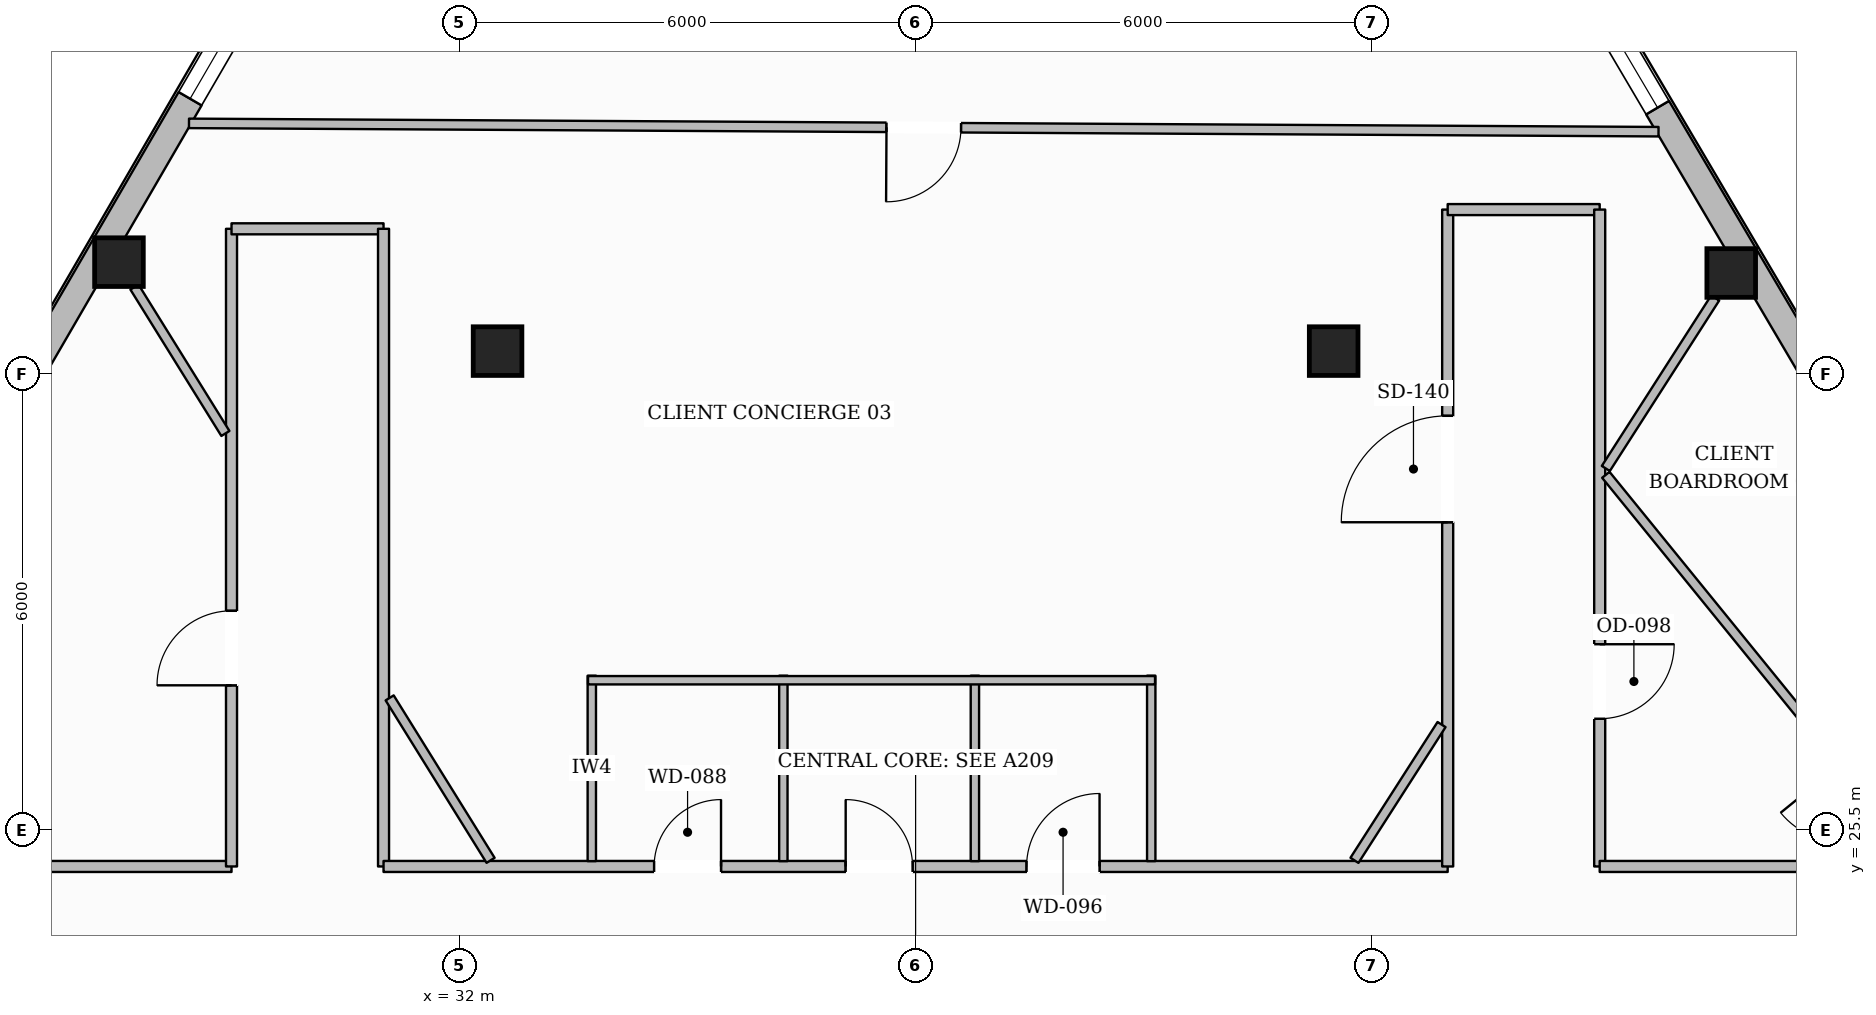
"""IFC4 building model, lengths in metres.
Left out: names, types, materials, properties, quantities, classifications, styles, units other than length and angle.
Written with IfcOpenShell. Run it as: python <this file> out.ifc"""

import sys

from ifc_helpers import new_model, si_unit, direction, frame, frame_2d, origin, origin_2d, place, context, subcontext, project, spatial, rectangle, hollow_rectangle, extrude, element, fill, save


model = new_model("IFC4")
c1 = context("Model", 3, precision=1e-05, world=origin(), true_north=direction((0.0, 1.0)))
c2 = subcontext(c1, "Body", "Model", "MODEL_VIEW")
j1 = project(units=[si_unit("LENGTHUNIT", "METRE"), si_unit("PLANEANGLEUNIT", "RADIAN")], contexts=[c1])
p1 = place(None, origin())
s1 = spatial("IfcSite", under=j1, at=p1, CompositionType="ELEMENT")
p2 = place(p1, origin())
s2 = spatial("IfcBuilding", under=s1, at=p2, CompositionType="ELEMENT")
p3 = place(p2, frame((0.0, 0.0, 195.8)))
s3 = spatial("IfcBuildingStorey", under=s2, at=p3, CompositionType="ELEMENT", Elevation=195.8)
for number, where, z_axis, x_axis in (
    (1, (27.519, 32.97, 0.0), (0.0, 0.0, 1.0), (1.0, 0.0, 0.0)),
    (2, (48.73, 32.828, 0.0), (0.0, 0.0, 1.0), (1.0, 0.0, 0.0)),
    (3, (32.5, 31.8, 0.0), (0.0, 0.0, 1.0), (1.0, 0.0, 0.0)),
    (4, (43.5, 31.8, 0.0), (0.0, 0.0, 1.0), (1.0, 0.0, 0.0)),
):
    element("IfcColumn", number, at=place(p3, frame(where, z_axis=z_axis, x_axis=x_axis)), inside=s3, PredefinedType="COLUMN", context=c2, shape_type="SweptSolid", body=[
        extrude(hollow_rectangle(XDim=0.64, YDim=0.64, WallThickness=0.028, at=origin_2d()), origin(), (0.0, 0.0, 1.0), 3.6),
    ])
p4 = place(p3, frame((14.773, 11.555, 0.0), z_axis=(0.0, 0.0, 1.0), x_axis=(0.502113441051, 0.864801764751, 0.0)))
e5 = element("IfcWall", 5, at=p4, inside=s3, PredefinedType="STANDARD", context=c2, shape_type="SweptSolid", body=[
    extrude(rectangle(XDim=37.618, YDim=0.35, at=frame_2d((18.809, 0.0))), origin(), (0.0, 0.0, 1.0), 3.132),
])
p5 = place(p4, frame((33.36, 0.0, 0.65)))
e6 = element("IfcOpeningElement", 6, at=p5, cuts=e5, PredefinedType="OPENING", context=c2, shape_type="SweptSolid", body=[
    extrude(rectangle(XDim=1.45, YDim=1.75, at=frame_2d((0.725, 0.875))), frame((0.0, 0.185, 0.0), z_axis=(0.0, -1.0, 0.0), x_axis=(1.0, 0.0, 0.0)), (0.0, 0.0, 1.0), 0.37),
])
p6 = place(p4, frame((27.25, 0.0, 0.65)))
e7 = element("IfcOpeningElement", 7, at=p6, cuts=e5, PredefinedType="OPENING", context=c2, shape_type="SweptSolid", body=[
    extrude(rectangle(XDim=1.45, YDim=1.75, at=frame_2d((0.725, 0.875))), frame((0.0, 0.185, 0.0), z_axis=(0.0, -1.0, 0.0), x_axis=(1.0, 0.0, 0.0)), (0.0, 0.0, 1.0), 0.37),
])
p7 = place(p4, frame((15.03, 0.0, 0.65)))
e8 = element("IfcOpeningElement", 8, at=p7, cuts=e5, PredefinedType="OPENING", context=c2, shape_type="SweptSolid", body=[
    extrude(rectangle(XDim=1.45, YDim=1.75, at=frame_2d((0.725, 0.875))), frame((0.0, 0.185, 0.0), z_axis=(0.0, -1.0, 0.0), x_axis=(1.0, 0.0, 0.0)), (0.0, 0.0, 1.0), 0.37),
])
p8 = place(p4, frame((8.92, 0.0, 0.65)))
e9 = element("IfcOpeningElement", 9, at=p8, cuts=e5, PredefinedType="OPENING", context=c2, shape_type="SweptSolid", body=[
    extrude(rectangle(XDim=1.45, YDim=1.75, at=frame_2d((0.725, 0.875))), frame((0.0, 0.185, 0.0), z_axis=(0.0, -1.0, 0.0), x_axis=(1.0, 0.0, 0.0)), (0.0, 0.0, 1.0), 0.37),
])
p9 = place(p4, frame((2.811, 0.0, 0.65)))
e10 = element("IfcOpeningElement", 10, at=p9, cuts=e5, PredefinedType="OPENING", context=c2, shape_type="SweptSolid", body=[
    extrude(rectangle(XDim=1.45, YDim=1.75, at=frame_2d((0.725, 0.875))), frame((0.0, 0.185, 0.0), z_axis=(0.0, -1.0, 0.0), x_axis=(1.0, 0.0, 0.0)), (0.0, 0.0, 1.0), 0.37),
])
p10 = place(p3, frame((42.444, 44.024, 0.0), z_axis=(0.0, 0.0, 1.0), x_axis=(0.507770038723, -0.861492651028, 0.0)))
e11 = element("IfcWall", 11, at=p10, inside=s3, PredefinedType="STANDARD", context=c2, shape_type="SweptSolid", body=[
    extrude(rectangle(XDim=38.049, YDim=0.35, at=frame_2d((19.024, 0.0))), origin(), (0.0, 0.0, 1.0), 3.132),
])
p11 = place(p10, frame((33.752, 0.0, 0.65)))
e12 = element("IfcOpeningElement", 12, at=p11, cuts=e11, PredefinedType="OPENING", context=c2, shape_type="SweptSolid", body=[
    extrude(rectangle(XDim=1.45, YDim=1.75, at=frame_2d((0.725, 0.875))), frame((0.0, 0.185, 0.0), z_axis=(0.0, -1.0, 0.0), x_axis=(1.0, 0.0, 0.0)), (0.0, 0.0, 1.0), 0.37),
])
p12 = place(p10, frame((27.569, 0.0, 0.65)))
e13 = element("IfcOpeningElement", 13, at=p12, cuts=e11, PredefinedType="OPENING", context=c2, shape_type="SweptSolid", body=[
    extrude(rectangle(XDim=1.45, YDim=1.75, at=frame_2d((0.725, 0.875))), frame((0.0, 0.185, 0.0), z_axis=(0.0, -1.0, 0.0), x_axis=(1.0, 0.0, 0.0)), (0.0, 0.0, 1.0), 0.37),
])
p13 = place(p10, frame((15.204, 0.0, 0.65)))
e14 = element("IfcOpeningElement", 14, at=p13, cuts=e11, PredefinedType="OPENING", context=c2, shape_type="SweptSolid", body=[
    extrude(rectangle(XDim=1.45, YDim=1.75, at=frame_2d((0.725, 0.875))), frame((0.0, 0.185, 0.0), z_axis=(0.0, -1.0, 0.0), x_axis=(1.0, 0.0, 0.0)), (0.0, 0.0, 1.0), 0.37),
])
p14 = place(p10, frame((9.021, 0.0, 0.65)))
e15 = element("IfcOpeningElement", 15, at=p14, cuts=e11, PredefinedType="OPENING", context=c2, shape_type="SweptSolid", body=[
    extrude(rectangle(XDim=1.45, YDim=1.75, at=frame_2d((0.725, 0.875))), frame((0.0, 0.185, 0.0), z_axis=(0.0, -1.0, 0.0), x_axis=(1.0, 0.0, 0.0)), (0.0, 0.0, 1.0), 0.37),
])
p15 = place(p10, frame((2.839, 0.0, 0.65)))
e16 = element("IfcOpeningElement", 16, at=p15, cuts=e11, PredefinedType="OPENING", context=c2, shape_type="SweptSolid", body=[
    extrude(rectangle(XDim=1.45, YDim=1.75, at=frame_2d((0.725, 0.875))), frame((0.0, 0.185, 0.0), z_axis=(0.0, -1.0, 0.0), x_axis=(1.0, 0.0, 0.0)), (0.0, 0.0, 1.0), 0.37),
])
p16 = place(p3, frame((26.06, 25.02, 0.0), z_axis=(0.0, 0.0, 1.0), x_axis=(1.0, 0.0, 0.0)))
e17 = element("IfcWall", 17, at=p16, inside=s3, PredefinedType="PARTITIONING", context=c2, shape_type="SweptSolid", body=[
    extrude(rectangle(XDim=2.94, YDim=0.145, at=frame_2d((1.47, 0.0))), origin(), (0.0, 0.0, 1.0), 3.6),
])
p17 = place(p3, frame((29.0, 25.02, 0.0), z_axis=(0.0, 0.0, 1.0), x_axis=(0.0, 1.0, 0.0)))
e18 = element("IfcWall", 18, at=p17, inside=s3, PredefinedType="PARTITIONING", context=c2, shape_type="SweptSolid", body=[
    extrude(rectangle(XDim=8.389, YDim=0.145, at=frame_2d((4.194, 0.0))), origin(), (0.0, 0.0, 1.0), 3.6),
])
p18 = place(p17, frame((2.383, 0.0, 0.0)))
e19 = element("IfcOpeningElement", 19, at=p18, cuts=e18, PredefinedType="OPENING", context=c2, shape_type="SweptSolid", body=[
    extrude(rectangle(XDim=0.98, YDim=2.15, at=frame_2d((0.49, 1.075))), frame((0.0, 0.083, 0.0), z_axis=(0.0, -1.0, 0.0), x_axis=(1.0, 0.0, 0.0)), (0.0, 0.0, 1.0), 0.165),
])
p19 = place(p3, frame((29.0, 33.409, 0.0), z_axis=(0.0, 0.0, 1.0), x_axis=(1.0, 0.0, 0.0)))
e20 = element("IfcWall", 20, at=p19, inside=s3, PredefinedType="PARTITIONING", context=c2, shape_type="SweptSolid", body=[
    extrude(rectangle(XDim=2.0, YDim=0.145, at=frame_2d((1.0, 0.0))), origin(), (0.0, 0.0, 1.0), 3.6),
])
p20 = place(p3, frame((31.0, 33.409, 0.0), z_axis=(0.0, 0.0, 1.0), x_axis=(0.0, -1.0, 0.0)))
e21 = element("IfcWall", 21, at=p20, inside=s3, PredefinedType="PARTITIONING", context=c2, shape_type="SweptSolid", body=[
    extrude(rectangle(XDim=8.389, YDim=0.145, at=frame_2d((4.194, 0.0))), origin(), (0.0, 0.0, 1.0), 3.6),
])
p21 = place(p3, frame((31.0, 25.02, 0.0), z_axis=(0.0, 0.0, 1.0), x_axis=(1.0, 0.0, 0.0)))
e22 = element("IfcWall", 22, at=p21, inside=s3, PredefinedType="PARTITIONING", context=c2, shape_type="SweptSolid", body=[
    extrude(rectangle(XDim=14.0, YDim=0.145, at=frame_2d((7.0, 0.0))), origin(), (0.0, 0.0, 1.0), 3.6),
])
p22 = place(p21, frame((3.56, 0.0, 0.0)))
e23 = element("IfcOpeningElement", 23, at=p22, cuts=e22, PredefinedType="OPENING", context=c2, shape_type="SweptSolid", body=[
    extrude(rectangle(XDim=0.88, YDim=2.1, at=frame_2d((0.44, 1.05))), frame((0.0, 0.083, 0.0), z_axis=(0.0, -1.0, 0.0), x_axis=(1.0, 0.0, 0.0)), (0.0, 0.0, 1.0), 0.165),
])
p23 = place(p21, frame((6.08, 0.0, 0.0)))
e24 = element("IfcOpeningElement", 24, at=p23, cuts=e22, PredefinedType="OPENING", context=c2, shape_type="SweptSolid", body=[
    extrude(rectangle(XDim=0.88, YDim=2.1, at=frame_2d((0.44, 1.05))), frame((0.0, 0.083, 0.0), z_axis=(0.0, -1.0, 0.0), x_axis=(1.0, 0.0, 0.0)), (0.0, 0.0, 1.0), 0.165),
])
p24 = place(p21, frame((8.46, 0.0, 0.0)))
e25 = element("IfcOpeningElement", 25, at=p24, cuts=e22, PredefinedType="OPENING", context=c2, shape_type="SweptSolid", body=[
    extrude(rectangle(XDim=0.96, YDim=2.1, at=frame_2d((0.48, 1.05))), frame((0.0, 0.083, 0.0), z_axis=(0.0, -1.0, 0.0), x_axis=(1.0, 0.0, 0.0)), (0.0, 0.0, 1.0), 0.165),
])
p25 = place(p3, frame((45.0, 25.02, 0.0), z_axis=(0.0, 0.0, 1.0), x_axis=(0.0, 1.0, 0.0)))
e26 = element("IfcWall", 26, at=p25, inside=s3, PredefinedType="PARTITIONING", context=c2, shape_type="SweptSolid", body=[
    extrude(rectangle(XDim=8.642, YDim=0.145, at=frame_2d((4.321, 0.0))), origin(), (0.0, 0.0, 1.0), 3.6),
])
p26 = place(p25, frame((4.529, 0.0, 0.0)))
e27 = element("IfcOpeningElement", 27, at=p26, cuts=e26, PredefinedType="OPENING", context=c2, shape_type="SweptSolid", body=[
    extrude(rectangle(XDim=1.4, YDim=2.2, at=frame_2d((0.7, 1.1))), frame((0.0, 0.083, 0.0), z_axis=(0.0, -1.0, 0.0), x_axis=(1.0, 0.0, 0.0)), (0.0, 0.0, 1.0), 0.165),
])
p27 = place(p3, frame((45.0, 33.662, 0.0), z_axis=(0.0, 0.0, 1.0), x_axis=(1.0, 0.0, 0.0)))
e28 = element("IfcWall", 28, at=p27, inside=s3, PredefinedType="PARTITIONING", context=c2, shape_type="SweptSolid", body=[
    extrude(rectangle(XDim=2.0, YDim=0.145, at=frame_2d((1.0, 0.0))), origin(), (0.0, 0.0, 1.0), 3.6),
])
p28 = place(p3, frame((47.0, 33.662, 0.0), z_axis=(0.0, 0.0, 1.0), x_axis=(0.0, -1.0, 0.0)))
e29 = element("IfcWall", 29, at=p28, inside=s3, PredefinedType="PARTITIONING", context=c2, shape_type="SweptSolid", body=[
    extrude(rectangle(XDim=8.642, YDim=0.145, at=frame_2d((4.321, 0.0))), origin(), (0.0, 0.0, 1.0), 3.6),
])
p29 = place(p28, frame((5.718, 0.0, 0.0)))
e30 = element("IfcOpeningElement", 30, at=p29, cuts=e29, PredefinedType="OPENING", context=c2, shape_type="SweptSolid", body=[
    extrude(rectangle(XDim=0.98, YDim=2.15, at=frame_2d((0.49, 1.075))), frame((0.0, 0.083, 0.0), z_axis=(0.0, -1.0, 0.0), x_axis=(1.0, 0.0, 0.0)), (0.0, 0.0, 1.0), 0.165),
])
p30 = place(p3, frame((47.0, 25.02, 0.0), z_axis=(0.0, 0.0, 1.0), x_axis=(1.0, 0.0, 0.0)))
e31 = element("IfcWall", 31, at=p30, inside=s3, PredefinedType="PARTITIONING", context=c2, shape_type="SweptSolid", body=[
    extrude(rectangle(XDim=2.94, YDim=0.145, at=frame_2d((1.47, 0.0))), origin(), (0.0, 0.0, 1.0), 3.6),
])
p31 = place(p3, frame((33.74, 25.09, 0.0), z_axis=(0.0, 0.0, 1.0), x_axis=(0.0, 1.0, 0.0)))
e32 = element("IfcWall", 32, at=p31, inside=s3, PredefinedType="PLUMBINGWALL", context=c2, shape_type="SweptSolid", body=[
    extrude(rectangle(XDim=2.44, YDim=0.11, at=frame_2d((1.22, 0.0))), origin(), (0.0, 0.0, 1.0), 3.141),
])
for number, where, z_axis, x_axis in (
    (33, (36.26, 25.09, 0.0), (0.0, 0.0, 1.0), (0.0, 1.0, 0.0)),
    (34, (38.78, 25.09, 0.0), (0.0, 0.0, 1.0), (0.0, 1.0, 0.0)),
    (35, (41.1, 25.09, 0.0), (0.0, 0.0, 1.0), (0.0, 1.0, 0.0)),
):
    element("IfcWall", number, at=place(p3, frame(where, z_axis=z_axis, x_axis=x_axis)), inside=s3, PredefinedType="PLUMBINGWALL", context=c2, shape_type="SweptSolid", body=[
        extrude(rectangle(XDim=2.44, YDim=0.11, at=frame_2d((1.22, 0.0))), origin(), (0.0, 0.0, 1.0), 3.6),
    ])
p32 = place(p3, frame((33.69, 27.47, 0.0), z_axis=(0.0, 0.0, 1.0), x_axis=(1.0, 0.0, 0.0)))
e36 = element("IfcWall", 36, at=p32, inside=s3, PredefinedType="PLUMBINGWALL", context=c2, shape_type="SweptSolid", body=[
    extrude(rectangle(XDim=7.46, YDim=0.11, at=frame_2d((3.73, 0.0))), origin(), (0.0, 0.0, 1.0), 3.6),
])
p33 = place(p3, frame((43.774, 25.101, 0.0), z_axis=(0.0, 0.0, 1.0), x_axis=(0.539879343567, 0.8417424157, 0.0)))
e37 = element("IfcWall", 37, at=p33, inside=s3, PredefinedType="PARTITIONING", context=c2, shape_type="SweptSolid", body=[
    extrude(rectangle(XDim=2.122, YDim=0.125, at=frame_2d((1.061, 0.0))), origin(), (0.0, 0.0, 1.0), 3.6),
])
p34 = place(p3, frame((47.081, 30.256, 0.0), z_axis=(0.0, 0.0, 1.0), x_axis=(0.539947349499, 0.841698793969, 0.0)))
e38 = element("IfcWall", 38, at=p34, inside=s3, PredefinedType="PARTITIONING", context=c2, shape_type="SweptSolid", body=[
    extrude(rectangle(XDim=2.666, YDim=0.125, at=frame_2d((1.333, 0.0))), origin(), (0.0, 0.0, 1.0), 3.6),
])
p35 = place(p3, frame((32.408, 25.101, 0.0), z_axis=(0.0, 0.0, 1.0), x_axis=(-0.527746847309, 0.84940171012, 0.0)))
e39 = element("IfcWall", 39, at=p35, inside=s3, PredefinedType="PARTITIONING", context=c2, shape_type="SweptSolid", body=[
    extrude(rectangle(XDim=2.516, YDim=0.125, at=frame_2d((1.258, 0.0))), origin(), (0.0, 0.0, 1.0), 3.6),
])
p36 = place(p3, frame((28.919, 30.716, 0.0), z_axis=(0.0, 0.0, 1.0), x_axis=(-0.527703212619, 0.849428819497, 0.0)))
e40 = element("IfcWall", 40, at=p36, inside=s3, PredefinedType="PARTITIONING", context=c2, shape_type="SweptSolid", body=[
    extrude(rectangle(XDim=2.267, YDim=0.125, at=frame_2d((1.134, 0.0))), origin(), (0.0, 0.0, 1.0), 3.6),
])
p37 = place(p3, frame((53.894, 21.793, 0.0), z_axis=(0.0, 0.0, 1.0), x_axis=(-0.630861507456, 0.775895455851, 0.0)))
e41 = element("IfcWall", 41, at=p37, inside=s3, PredefinedType="PARTITIONING", context=c2, shape_type="SweptSolid", body=[
    extrude(rectangle(XDim=10.8, YDim=0.125, at=frame_2d((5.4, 0.0))), origin(), (0.0, 0.0, 1.0), 3.339),
])
p38 = place(p37, frame((4.88, 0.0, 0.0)))
e42 = element("IfcOpeningElement", 42, at=p38, cuts=e41, PredefinedType="OPENING", context=c2, shape_type="SweptSolid", body=[
    extrude(rectangle(XDim=1.02, YDim=2.15, at=frame_2d((0.51, 1.075))), frame((0.0, 0.073, 0.0), z_axis=(0.0, -1.0, 0.0), x_axis=(1.0, 0.0, 0.0)), (0.0, 0.0, 1.0), 0.145),
])
p39 = place(p3, frame((47.774, 34.687, 0.0), z_axis=(0.0, 0.0, 1.0), x_axis=(-0.999983926054, 0.005669888277, 0.0)))
e43 = element("IfcWall", 43, at=p39, inside=s3, PredefinedType="PARTITIONING", context=c2, shape_type="SweptSolid", body=[
    extrude(rectangle(XDim=19.333, YDim=0.125, at=frame_2d((9.667, 0.0))), origin(), (0.0, 0.0, 1.0), 3.6),
])
p40 = place(p39, frame((9.177, 0.0, 0.0)))
e44 = element("IfcOpeningElement", 44, at=p40, cuts=e43, PredefinedType="OPENING", context=c2, shape_type="SweptSolid", body=[
    extrude(rectangle(XDim=0.98, YDim=2.15, at=frame_2d((0.49, 1.075))), frame((0.0, 0.073, 0.0), z_axis=(0.0, -1.0, 0.0), x_axis=(1.0, 0.0, 0.0)), (0.0, 0.0, 1.0), 0.145),
])
p41 = place(p6, origin())
e45 = element("IfcWindow", 45, at=p41, inside=s3, PartitioningType="SINGLE_PANEL", PredefinedType="WINDOW", context=c2, shape_type="SweptSolid", body=[
    extrude(rectangle(XDim=1.45, YDim=1.75, at=frame_2d((0.725, 0.875))), frame((0.0, 0.03, 0.0), z_axis=(0.0, -1.0, 0.0), x_axis=(1.0, 0.0, 0.0)), (0.0, 0.0, 1.0), 0.06),
])
fill(e7, e45)
p42 = place(p14, origin())
e46 = element("IfcWindow", 46, at=p42, inside=s3, PartitioningType="SINGLE_PANEL", PredefinedType="WINDOW", context=c2, shape_type="SweptSolid", body=[
    extrude(rectangle(XDim=1.45, YDim=1.75, at=frame_2d((0.725, 0.875))), frame((0.0, 0.03, 0.0), z_axis=(0.0, -1.0, 0.0), x_axis=(1.0, 0.0, 0.0)), (0.0, 0.0, 1.0), 0.06),
])
fill(e15, e46)
p43 = place(p22, origin())
e47 = element("IfcDoor", 47, at=p43, inside=s3, OperationType="SINGLE_SWING_RIGHT", PredefinedType="DOOR", context=c2, shape_type="SweptSolid", body=[
    extrude(rectangle(XDim=0.88, YDim=2.1, at=frame_2d((0.44, 1.05))), frame((0.0, 0.025, 0.0), z_axis=(0.0, -1.0, 0.0), x_axis=(1.0, 0.0, 0.0)), (0.0, 0.0, 1.0), 0.05),
])
fill(e23, e47)
p44 = place(p23, origin())
e48 = element("IfcDoor", 48, at=p44, inside=s3, OperationType="SINGLE_SWING_LEFT", PredefinedType="DOOR", context=c2, shape_type="SweptSolid", body=[
    extrude(rectangle(XDim=0.88, YDim=2.1, at=frame_2d((0.44, 1.05))), frame((0.0, 0.025, 0.0), z_axis=(0.0, -1.0, 0.0), x_axis=(1.0, 0.0, 0.0)), (0.0, 0.0, 1.0), 0.05),
])
fill(e24, e48)
p45 = place(p24, origin())
e49 = element("IfcDoor", 49, at=p45, inside=s3, OperationType="SINGLE_SWING_RIGHT", PredefinedType="DOOR", context=c2, shape_type="SweptSolid", body=[
    extrude(rectangle(XDim=0.96, YDim=2.1, at=frame_2d((0.48, 1.05))), frame((0.0, 0.025, 0.0), z_axis=(0.0, -1.0, 0.0), x_axis=(1.0, 0.0, 0.0)), (0.0, 0.0, 1.0), 0.05),
])
fill(e25, e49)
p46 = place(p29, origin())
e50 = element("IfcDoor", 50, at=p46, inside=s3, OperationType="SINGLE_SWING_LEFT", PredefinedType="DOOR", context=c2, shape_type="SweptSolid", body=[
    extrude(rectangle(XDim=0.98, YDim=2.15, at=frame_2d((0.49, 1.075))), frame((0.0, 0.025, 0.0), z_axis=(0.0, -1.0, 0.0), x_axis=(1.0, 0.0, 0.0)), (0.0, 0.0, 1.0), 0.05),
])
fill(e30, e50)
p47 = place(p26, origin())
e51 = element("IfcDoor", 51, at=p47, inside=s3, OperationType="SINGLE_SWING_LEFT", PredefinedType="DOOR", context=c2, shape_type="SweptSolid", body=[
    extrude(rectangle(XDim=1.4, YDim=2.2, at=frame_2d((0.7, 1.1))), frame((0.0, 0.025, 0.0), z_axis=(0.0, -1.0, 0.0), x_axis=(1.0, 0.0, 0.0)), (0.0, 0.0, 1.0), 0.05),
])
fill(e27, e51)
p48 = place(p40, origin())
e52 = element("IfcDoor", 52, at=p48, inside=s3, OperationType="SINGLE_SWING_RIGHT", PredefinedType="DOOR", context=c2, shape_type="SweptSolid", body=[
    extrude(rectangle(XDim=0.98, YDim=2.15, at=frame_2d((0.49, 1.075))), frame((0.0, 0.025, 0.0), z_axis=(0.0, -1.0, 0.0), x_axis=(1.0, 0.0, 0.0)), (0.0, 0.0, 1.0), 0.05),
])
fill(e44, e52)
p49 = place(p18, origin())
e53 = element("IfcDoor", 53, at=p49, inside=s3, OperationType="SINGLE_SWING_LEFT", PredefinedType="DOOR", context=c2, shape_type="SweptSolid", body=[
    extrude(rectangle(XDim=0.98, YDim=2.15, at=frame_2d((0.49, 1.075))), frame((0.0, 0.025, 0.0), z_axis=(0.0, -1.0, 0.0), x_axis=(1.0, 0.0, 0.0)), (0.0, 0.0, 1.0), 0.05),
])
fill(e19, e53)
save(model, sys.argv[1])
